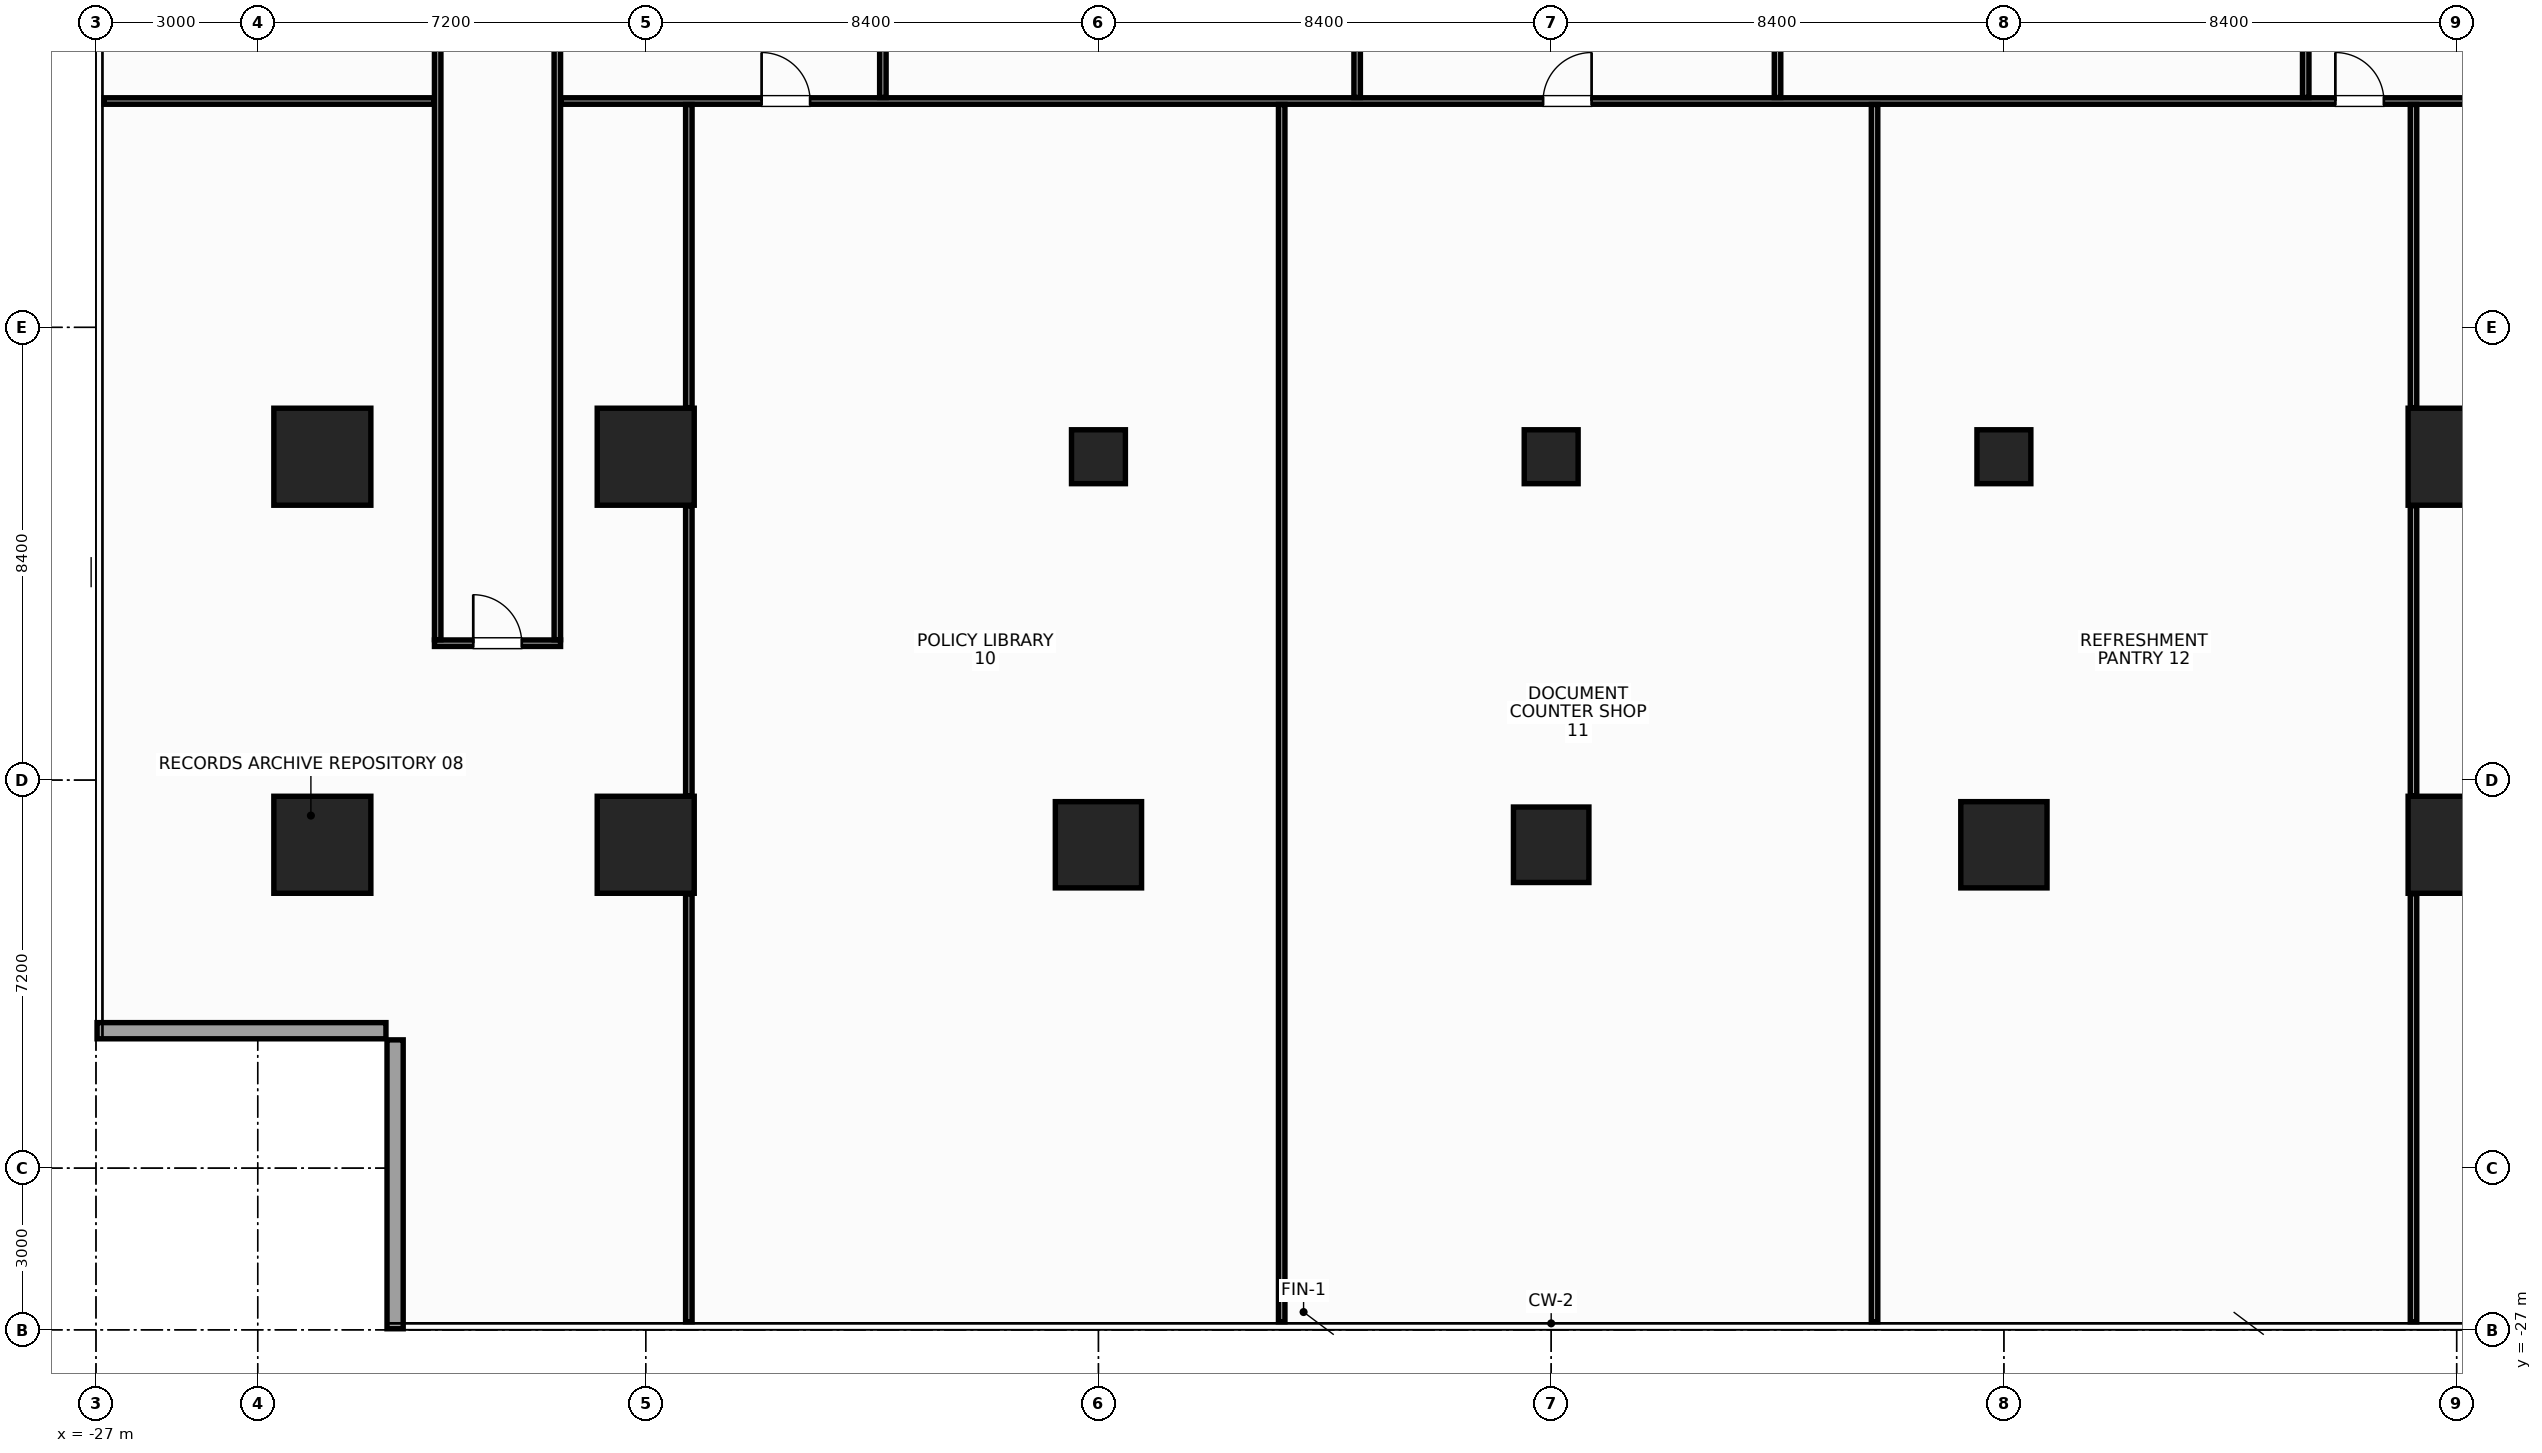
"""IFC4 building model, lengths in metres.
Left out: names, types, materials, properties, quantities, classifications, styles, units other than length and angle.
Written with IfcOpenShell. Run it as: python <this file> out.ifc"""

import sys

from ifc_helpers import new_model, si_unit, direction, frame, frame_2d, origin, origin_2d, place, context, subcontext, project, spatial, rectangle, hollow_rectangle, extrude, source, transform, mapped, element, fill, save


model = new_model("IFC4")
c1 = context("Model", 3, precision=1e-05, world=origin(), true_north=direction((0.0, 1.0)))
c2 = subcontext(c1, "Body", "Model", "MODEL_VIEW")
j1 = project(units=[si_unit("LENGTHUNIT", "METRE"), si_unit("PLANEANGLEUNIT", "RADIAN")], contexts=[c1])
p1 = place(None, origin())
s1 = spatial("IfcSite", under=j1, at=p1, CompositionType="ELEMENT")
p2 = place(p1, origin())
s2 = spatial("IfcBuilding", under=s1, at=p2, CompositionType="ELEMENT")
p3 = place(p2, frame((0.0, 0.0, 27.2)))
s3 = spatial("IfcBuildingStorey", under=s2, at=p3, CompositionType="ELEMENT", Elevation=27.2)
m1 = source(origin(), c2, "Body", "SweptSolid", [
    extrude(rectangle(XDim=1.8, YDim=1.8, at=origin_2d()), origin(), (0.0, 0.0, 1.0), 3.6),
])
for number, where, z_axis, x_axis in (
    (1, (-16.8, -18.0, 0.0), (0.0, 0.0, 1.0), (1.0, 0.0, 0.0)),
    (2, (-16.8, -10.8, 0.0), (0.0, 0.0, 1.0), (1.0, 0.0, 0.0)),
    (3, (16.8, -18.0, 0.0), (0.0, 0.0, 1.0), (1.0, 0.0, 0.0)),
    (4, (16.8, -10.8, 0.0), (0.0, 0.0, 1.0), (1.0, 0.0, 0.0)),
    (5, (-22.8, -18.0, 0.0), (0.0, 0.0, 1.0), (1.0, 0.0, 0.0)),
    (6, (-22.8, -10.8, 0.0), (0.0, 0.0, 1.0), (1.0, 0.0, 0.0)),
):
    element("IfcColumn", number, at=place(p3, frame(where, z_axis=z_axis, x_axis=x_axis)), inside=s3, PredefinedType="COLUMN", context=c2, shape_type="MappedRepresentation", body=[
        mapped(m1, transform((0.0, 0.0, 0.0), x_axis=(1.0, 0.0, 0.0), y_axis=(0.0, 1.0, 0.0), z_axis=(0.0, 0.0, 1.0), scale=1.0)),
    ])
m2 = source(origin(), c2, "Body", "SweptSolid", [
    extrude(rectangle(XDim=1.6, YDim=1.6, at=origin_2d()), origin(), (0.0, 0.0, 1.0), 3.6),
])
p4 = place(p3, frame((-8.4, -18.0, 0.0), z_axis=(0.0, 0.0, 1.0), x_axis=(1.0, 0.0, 0.0)))
e7 = element("IfcColumn", 7, at=p4, inside=s3, PredefinedType="COLUMN", context=c2, shape_type="MappedRepresentation", body=[
    mapped(m2, transform((0.0, 0.0, 0.0), x_axis=(1.0, 0.0, 0.0), y_axis=(0.0, 1.0, 0.0), z_axis=(0.0, 0.0, 1.0), scale=1.0)),
])
m3 = source(origin(), c2, "Body", "SweptSolid", [
    extrude(hollow_rectangle(XDim=1.0, YDim=1.0, WallThickness=0.045, at=origin_2d()), origin(), (0.0, 0.0, 1.0), 3.6),
])
p5 = place(p3, frame((-8.4, -10.8, 0.0), z_axis=(0.0, 0.0, 1.0), x_axis=(1.0, 0.0, 0.0)))
e8 = element("IfcColumn", 8, at=p5, inside=s3, PredefinedType="COLUMN", context=c2, shape_type="MappedRepresentation", body=[
    mapped(m3, transform((0.0, 0.0, 0.0), x_axis=(1.0, 0.0, 0.0), y_axis=(0.0, 1.0, 0.0), z_axis=(0.0, 0.0, 1.0), scale=1.0)),
])
p6 = place(p3, frame((8.4, -18.0, 0.0), z_axis=(0.0, 0.0, 1.0), x_axis=(1.0, 0.0, 0.0)))
e9 = element("IfcColumn", 9, at=p6, inside=s3, PredefinedType="COLUMN", context=c2, shape_type="MappedRepresentation", body=[
    mapped(m2, transform((0.0, 0.0, 0.0), x_axis=(1.0, 0.0, 0.0), y_axis=(0.0, 1.0, 0.0), z_axis=(0.0, 0.0, 1.0), scale=1.0)),
])
p7 = place(p3, frame((8.4, -10.8, 0.0), z_axis=(0.0, 0.0, 1.0), x_axis=(1.0, 0.0, 0.0)))
e10 = element("IfcColumn", 10, at=p7, inside=s3, PredefinedType="COLUMN", context=c2, shape_type="MappedRepresentation", body=[
    mapped(m3, transform((0.0, 0.0, 0.0), x_axis=(1.0, 0.0, 0.0), y_axis=(0.0, 1.0, 0.0), z_axis=(0.0, 0.0, 1.0), scale=1.0)),
])
m4 = source(origin(), c2, "Body", "SweptSolid", [
    extrude(rectangle(XDim=1.4, YDim=1.4, at=origin_2d()), origin(), (0.0, 0.0, 1.0), 3.6),
])
p8 = place(p3, frame((0.0, -18.0, 0.0), z_axis=(0.0, 0.0, 1.0), x_axis=(1.0, 0.0, 0.0)))
e11 = element("IfcColumn", 11, at=p8, inside=s3, PredefinedType="COLUMN", context=c2, shape_type="MappedRepresentation", body=[
    mapped(m4, transform((0.0, 0.0, 0.0), x_axis=(1.0, 0.0, 0.0), y_axis=(0.0, 1.0, 0.0), z_axis=(0.0, 0.0, 1.0), scale=1.0)),
])
m5 = source(origin(), c2, "Body", "SweptSolid", [
    extrude(rectangle(XDim=1.0, YDim=1.0, at=origin_2d()), origin(), (0.0, 0.0, 1.0), 3.6),
])
p9 = place(p3, frame((0.0, -10.8, 0.0), z_axis=(0.0, 0.0, 1.0), x_axis=(1.0, 0.0, 0.0)))
e12 = element("IfcColumn", 12, at=p9, inside=s3, PredefinedType="COLUMN", context=c2, shape_type="MappedRepresentation", body=[
    mapped(m5, transform((0.0, 0.0, 0.0), x_axis=(1.0, 0.0, 0.0), y_axis=(0.0, 1.0, 0.0), z_axis=(0.0, 0.0, 1.0), scale=1.0)),
])
m6 = source(origin(), c2, "Body", "SweptSolid", [
    extrude(rectangle(XDim=5.36, YDim=0.3, at=frame_2d((2.68, 0.0))), origin(), (0.0, 0.0, 1.0), 2.74),
])
for number, where, z_axis, x_axis in (
    (13, (-26.98, -21.45, 0.0), (0.0, 0.0, 1.0), (1.0, 0.0, 0.0)),
    (14, (-21.45, -21.62, 0.0), (0.0, 0.0, 1.0), (0.0, -1.0, 0.0)),
):
    element("IfcWall", number, at=place(p3, frame(where, z_axis=z_axis, x_axis=x_axis)), inside=s3, PredefinedType="STANDARD", context=c2, shape_type="MappedRepresentation", body=[
        mapped(m6, transform((0.0, 0.0, 0.0), x_axis=(1.0, 0.0, 0.0), y_axis=(0.0, 1.0, 0.0), z_axis=(0.0, 0.0, 1.0), scale=1.0)),
    ])
m7 = source(origin(), c2, "Body", "SweptSolid", [
    extrude(rectangle(XDim=2.34, YDim=0.12, at=frame_2d((1.17, 0.0))), origin(), (0.0, 0.0, 1.0), 2.945),
])
p10 = place(p3, frame((-20.72, -14.26, 0.0), z_axis=(0.0, 0.0, 1.0), x_axis=(1.0, 0.0, 0.0)))
e15 = element("IfcWall", 15, at=p10, inside=s3, PredefinedType="PARTITIONING", context=c2, shape_type="MappedRepresentation", body=[
    mapped(m7, transform((0.0, 0.0, 0.0), x_axis=(1.0, 0.0, 0.0), y_axis=(0.0, 1.0, 0.0), z_axis=(0.0, 0.0, 1.0), scale=1.0)),
])
p11 = place(p10, frame((0.72, 0.0, 0.0)))
e16 = element("IfcOpeningElement", 16, at=p11, cuts=e15, PredefinedType="OPENING", context=c2, shape_type="SweptSolid", body=[
    extrude(rectangle(XDim=0.9, YDim=2.15, at=frame_2d((0.45, 1.075))), frame((0.0, 0.072, 0.0), z_axis=(0.0, -1.0, 0.0), x_axis=(1.0, 0.0, 0.0)), (0.0, 0.0, 1.0), 0.144),
])
m8 = source(origin(), c2, "Body", "SweptSolid", [
    extrude(rectangle(XDim=24.13, YDim=0.12, at=frame_2d((12.065, 0.0))), origin(), (0.0, 0.0, 1.0), 2.745),
])
p12 = place(p3, frame((-20.66, -14.195, 0.0), z_axis=(0.0, 0.0, 1.0), x_axis=(0.0, 1.0, 0.0)))
e17 = element("IfcWall", 17, at=p12, inside=s3, PredefinedType="PARTITIONING", context=c2, shape_type="MappedRepresentation", body=[
    mapped(m8, transform((0.0, 0.0, 0.0), x_axis=(1.0, 0.0, 0.0), y_axis=(0.0, 1.0, 0.0), z_axis=(0.0, 0.0, 1.0), scale=1.0)),
])
p13 = place(p12, frame((16.583, 0.0, 0.0)))
e18 = element("IfcOpeningElement", 18, at=p13, cuts=e17, PredefinedType="OPENING", context=c2, shape_type="SweptSolid", body=[
    extrude(rectangle(XDim=0.9, YDim=2.15, at=frame_2d((0.45, 1.075))), frame((0.0, 0.072, 0.0), z_axis=(0.0, -1.0, 0.0), x_axis=(1.0, 0.0, 0.0)), (0.0, 0.0, 1.0), 0.144),
])
m9 = source(origin(), c2, "Body", "SweptSolid", [
    extrude(rectangle(XDim=21.995, YDim=0.12, at=frame_2d((10.998, 0.0))), origin(), (0.0, 0.0, 1.0), 2.745),
])
p14 = place(p3, frame((-18.44, -14.195, 0.0), z_axis=(0.0, 0.0, 1.0), x_axis=(0.0, 1.0, 0.0)))
e19 = element("IfcWall", 19, at=p14, inside=s3, PredefinedType="PARTITIONING", context=c2, shape_type="MappedRepresentation", body=[
    mapped(m9, transform((0.0, 0.0, 0.0), x_axis=(1.0, 0.0, 0.0), y_axis=(0.0, 1.0, 0.0), z_axis=(0.0, 0.0, 1.0), scale=1.0)),
])
m10 = source(origin(), c2, "Body", "SweptSolid", [
    extrude(rectangle(XDim=6.125, YDim=0.12, at=frame_2d((3.062, 0.0))), origin(), (0.0, 0.0, 1.0), 2.745),
])
p15 = place(p3, frame((-26.85, -4.2, 0.0), z_axis=(0.0, 0.0, 1.0), x_axis=(1.0, 0.0, 0.0)))
e20 = element("IfcWall", 20, at=p15, inside=s3, PredefinedType="PARTITIONING", context=c2, shape_type="MappedRepresentation", body=[
    mapped(m10, transform((0.0, 0.0, 0.0), x_axis=(1.0, 0.0, 0.0), y_axis=(0.0, 1.0, 0.0), z_axis=(0.0, 0.0, 1.0), scale=1.0)),
])
m11 = source(origin(), c2, "Body", "SweptSolid", [
    extrude(rectangle(XDim=36.75, YDim=0.12, at=frame_2d((18.375, 0.0))), origin(), (0.0, 0.0, 1.0), 2.745),
])
p16 = place(p3, frame((-18.375, -4.2, 0.0), z_axis=(0.0, 0.0, 1.0), x_axis=(1.0, 0.0, 0.0)))
e21 = element("IfcWall", 21, at=p16, inside=s3, PredefinedType="PARTITIONING", context=c2, shape_type="MappedRepresentation", body=[
    mapped(m11, transform((0.0, 0.0, 0.0), x_axis=(1.0, 0.0, 0.0), y_axis=(0.0, 1.0, 0.0), z_axis=(0.0, 0.0, 1.0), scale=1.0)),
])
p17 = place(p16, frame((3.725, 0.0, 0.0)))
e22 = element("IfcOpeningElement", 22, at=p17, cuts=e21, PredefinedType="OPENING", context=c2, shape_type="SweptSolid", body=[
    extrude(rectangle(XDim=0.9, YDim=2.15, at=frame_2d((0.45, 1.075))), frame((0.0, 0.072, 0.0), z_axis=(0.0, -1.0, 0.0), x_axis=(1.0, 0.0, 0.0)), (0.0, 0.0, 1.0), 0.144),
])
p18 = place(p16, frame((18.225, 0.0, 0.0)))
e23 = element("IfcOpeningElement", 23, at=p18, cuts=e21, PredefinedType="OPENING", context=c2, shape_type="SweptSolid", body=[
    extrude(rectangle(XDim=0.9, YDim=2.15, at=frame_2d((0.45, 1.075))), frame((0.0, 0.072, 0.0), z_axis=(0.0, -1.0, 0.0), x_axis=(1.0, 0.0, 0.0)), (0.0, 0.0, 1.0), 0.144),
])
p19 = place(p16, frame((32.925, 0.0, 0.0)))
e24 = element("IfcOpeningElement", 24, at=p19, cuts=e21, PredefinedType="OPENING", context=c2, shape_type="SweptSolid", body=[
    extrude(rectangle(XDim=0.9, YDim=2.15, at=frame_2d((0.45, 1.075))), frame((0.0, 0.072, 0.0), z_axis=(0.0, -1.0, 0.0), x_axis=(1.0, 0.0, 0.0)), (0.0, 0.0, 1.0), 0.144),
])
m12 = source(origin(), c2, "Body", "SweptSolid", [
    extrude(rectangle(XDim=11.81, YDim=0.12, at=frame_2d((5.905, 0.0))), origin(), (0.0, 0.0, 1.0), 2.301),
])
for number, where, z_axis, x_axis in (
    (25, (-12.4, -4.135, 0.0), (0.0, 0.0, 1.0), (0.0, 1.0, 0.0)),
    (26, (-3.6, -4.135, 0.0), (0.0, 0.0, 1.0), (0.0, 1.0, 0.0)),
    (27, (4.2, -4.135, 0.0), (0.0, 0.0, 1.0), (0.0, 1.0, 0.0)),
    (28, (14.0, -4.135, 0.0), (0.0, 0.0, 1.0), (0.0, 1.0, 0.0)),
):
    element("IfcWall", number, at=place(p3, frame(where, z_axis=z_axis, x_axis=x_axis)), inside=s3, PredefinedType="PARTITIONING", context=c2, shape_type="MappedRepresentation", body=[
        mapped(m12, transform((0.0, 0.0, 0.0), x_axis=(1.0, 0.0, 0.0), y_axis=(0.0, 1.0, 0.0), z_axis=(0.0, 0.0, 1.0), scale=1.0)),
    ])
m13 = source(origin(), c2, "Body", "SweptSolid", [
    extrude(rectangle(XDim=7.94, YDim=0.12, at=frame_2d((3.97, 0.0))), origin(), (0.0, 0.0, 1.0), 3.36),
])
p20 = place(p3, frame((-16.0, -26.85, 0.0), z_axis=(0.0, 0.0, 1.0), x_axis=(0.0, 1.0, 0.0)))
e29 = element("IfcWall", 29, at=p20, inside=s3, PredefinedType="PARTITIONING", context=c2, shape_type="MappedRepresentation", body=[
    mapped(m13, transform((0.0, 0.0, 0.0), x_axis=(1.0, 0.0, 0.0), y_axis=(0.0, 1.0, 0.0), z_axis=(0.0, 0.0, 1.0), scale=1.0)),
])
m14 = source(origin(), c2, "Body", "SweptSolid", [
    extrude(rectangle(XDim=5.38, YDim=0.12, at=frame_2d((2.69, 0.0))), origin(), (0.0, 0.0, 1.0), 3.36),
])
p21 = place(p3, frame((-16.0, -17.09, 0.0), z_axis=(0.0, 0.0, 1.0), x_axis=(0.0, 1.0, 0.0)))
e30 = element("IfcWall", 30, at=p21, inside=s3, PredefinedType="PARTITIONING", context=c2, shape_type="MappedRepresentation", body=[
    mapped(m14, transform((0.0, 0.0, 0.0), x_axis=(1.0, 0.0, 0.0), y_axis=(0.0, 1.0, 0.0), z_axis=(0.0, 0.0, 1.0), scale=1.0)),
])
m15 = source(origin(), c2, "Body", "SweptSolid", [
    extrude(rectangle(XDim=5.625, YDim=0.12, at=frame_2d((2.812, 0.0))), origin(), (0.0, 0.0, 1.0), 3.36),
])
p22 = place(p3, frame((-16.0, -9.89, 0.0), z_axis=(0.0, 0.0, 1.0), x_axis=(0.0, 1.0, 0.0)))
e31 = element("IfcWall", 31, at=p22, inside=s3, PredefinedType="PARTITIONING", context=c2, shape_type="MappedRepresentation", body=[
    mapped(m15, transform((0.0, 0.0, 0.0), x_axis=(1.0, 0.0, 0.0), y_axis=(0.0, 1.0, 0.0), z_axis=(0.0, 0.0, 1.0), scale=1.0)),
])
m16 = source(origin(), c2, "Body", "SweptSolid", [
    extrude(rectangle(XDim=22.585, YDim=0.12, at=frame_2d((11.292, 0.0))), origin(), (0.0, 0.0, 1.0), 2.745),
])
for number, where, z_axis, x_axis in (
    (32, (-5.0, -26.85, 0.0), (0.0, 0.0, 1.0), (0.0, 1.0, 0.0)),
    (33, (6.0, -26.85, 0.0), (0.0, 0.0, 1.0), (0.0, 1.0, 0.0)),
):
    element("IfcWall", number, at=place(p3, frame(where, z_axis=z_axis, x_axis=x_axis)), inside=s3, PredefinedType="PARTITIONING", context=c2, shape_type="MappedRepresentation", body=[
        mapped(m16, transform((0.0, 0.0, 0.0), x_axis=(1.0, 0.0, 0.0), y_axis=(0.0, 1.0, 0.0), z_axis=(0.0, 0.0, 1.0), scale=1.0)),
    ])
p23 = place(p3, frame((16.0, -26.85, 0.0), z_axis=(0.0, 0.0, 1.0), x_axis=(0.0, 1.0, 0.0)))
e34 = element("IfcWall", 34, at=p23, inside=s3, PredefinedType="PARTITIONING", context=c2, shape_type="MappedRepresentation", body=[
    mapped(m13, transform((0.0, 0.0, 0.0), x_axis=(1.0, 0.0, 0.0), y_axis=(0.0, 1.0, 0.0), z_axis=(0.0, 0.0, 1.0), scale=1.0)),
])
p24 = place(p3, frame((16.0, -17.09, 0.0), z_axis=(0.0, 0.0, 1.0), x_axis=(0.0, 1.0, 0.0)))
e35 = element("IfcWall", 35, at=p24, inside=s3, PredefinedType="PARTITIONING", context=c2, shape_type="MappedRepresentation", body=[
    mapped(m14, transform((0.0, 0.0, 0.0), x_axis=(1.0, 0.0, 0.0), y_axis=(0.0, 1.0, 0.0), z_axis=(0.0, 0.0, 1.0), scale=1.0)),
])
p25 = place(p3, frame((16.0, -9.89, 0.0), z_axis=(0.0, 0.0, 1.0), x_axis=(0.0, 1.0, 0.0)))
e36 = element("IfcWall", 36, at=p25, inside=s3, PredefinedType="PARTITIONING", context=c2, shape_type="MappedRepresentation", body=[
    mapped(m15, transform((0.0, 0.0, 0.0), x_axis=(1.0, 0.0, 0.0), y_axis=(0.0, 1.0, 0.0), z_axis=(0.0, 0.0, 1.0), scale=1.0)),
])
m17 = source(origin(), c2, "Body", "SweptSolid", [
    extrude(rectangle(XDim=0.9, YDim=2.15, at=frame_2d((0.45, 1.075))), frame((0.0, 0.025, 0.0), z_axis=(0.0, -1.0, 0.0), x_axis=(1.0, 0.0, 0.0)), (0.0, 0.0, 1.0), 0.05),
])
p26 = place(p11, origin())
e37 = element("IfcDoor", 37, at=p26, inside=s3, OperationType="SINGLE_SWING_LEFT", PredefinedType="DOOR", context=c2, shape_type="MappedRepresentation", body=[
    mapped(m17, transform((0.0, 0.0, 0.0), x_axis=(1.0, 0.0, 0.0), y_axis=(0.0, 1.0, 0.0), z_axis=(0.0, 0.0, 1.0), scale=1.0)),
])
fill(e16, e37)
p27 = place(p17, origin())
e38 = element("IfcDoor", 38, at=p27, inside=s3, OperationType="SINGLE_SWING_LEFT", PredefinedType="DOOR", context=c2, shape_type="MappedRepresentation", body=[
    mapped(m17, transform((0.0, 0.0, 0.0), x_axis=(1.0, 0.0, 0.0), y_axis=(0.0, 1.0, 0.0), z_axis=(0.0, 0.0, 1.0), scale=1.0)),
])
fill(e22, e38)
p28 = place(p18, origin())
e39 = element("IfcDoor", 39, at=p28, inside=s3, OperationType="SINGLE_SWING_RIGHT", PredefinedType="DOOR", context=c2, shape_type="MappedRepresentation", body=[
    mapped(m17, transform((0.0, 0.0, 0.0), x_axis=(1.0, 0.0, 0.0), y_axis=(0.0, 1.0, 0.0), z_axis=(0.0, 0.0, 1.0), scale=1.0)),
])
fill(e23, e39)
p29 = place(p19, origin())
e40 = element("IfcDoor", 40, at=p29, inside=s3, OperationType="SINGLE_SWING_LEFT", PredefinedType="DOOR", context=c2, shape_type="MappedRepresentation", body=[
    mapped(m17, transform((0.0, 0.0, 0.0), x_axis=(1.0, 0.0, 0.0), y_axis=(0.0, 1.0, 0.0), z_axis=(0.0, 0.0, 1.0), scale=1.0)),
])
fill(e24, e40)
save(model, sys.argv[1])
